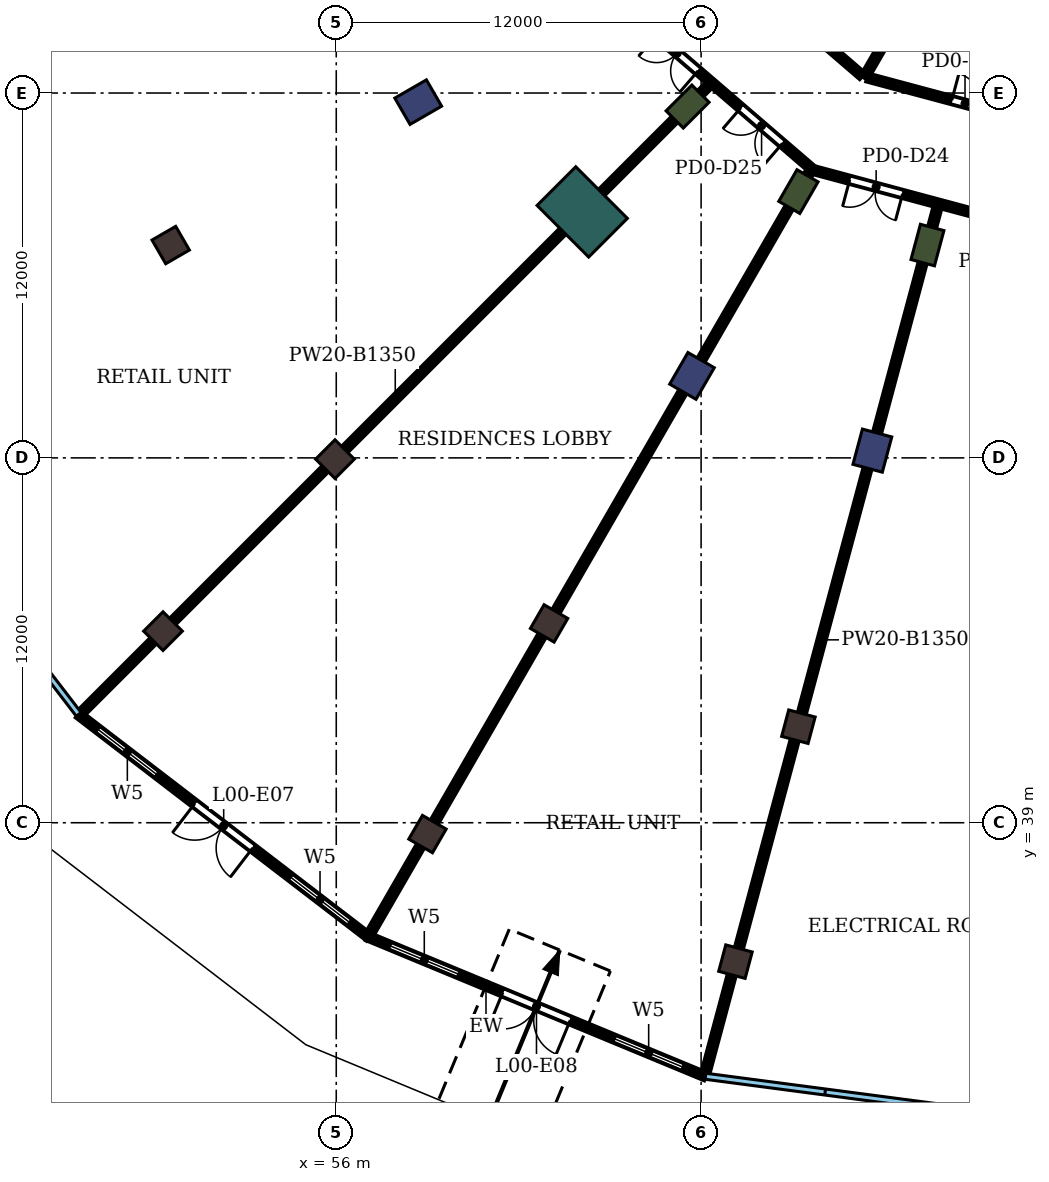
"""IFC4 building model, lengths in metres.
Left out: names, types, materials, properties, quantities, classifications, styles, units other than length and angle.
Written with IfcOpenShell. Run it as: python <this file> out.ifc"""

import sys

from ifc_helpers import new_model, si_unit, direction, frame, frame_2d, origin, origin_2d, place, context, subcontext, project, spatial, rectangle, extrude, element, fill, save


model = new_model("IFC4")
c1 = context("Model", 3, precision=1e-05, world=origin(), true_north=direction((0.0, 1.0)))
c2 = subcontext(c1, "Body", "Model", "MODEL_VIEW")
j1 = project(units=[si_unit("LENGTHUNIT", "METRE"), si_unit("PLANEANGLEUNIT", "RADIAN")], contexts=[c1])
p1 = place(None, origin())
s1 = spatial("IfcSite", under=j1, at=p1, CompositionType="ELEMENT")
p2 = place(p1, origin())
s2 = spatial("IfcBuilding", under=s1, at=p2, CompositionType="ELEMENT")
p3 = place(p2, origin())
s3 = spatial("IfcBuildingStorey", under=s2, at=p3, CompositionType="ELEMENT", Elevation=0.0)
for number, where, z_axis, x_axis in (
    (1, (50.302, 45.302, 0.0), (0.0, 0.0, 1.0), (-0.707, -0.707, 0.0)),
    (2, (59.0, 38.627, 0.0), (0.0, 0.0, 1.0), (-0.5, -0.866, 0.0)),
    (3, (69.13, 34.431, 0.0), (0.0, 0.0, 1.0), (-0.259, -0.966, 0.0)),
    (4, (50.555, 58.0, 0.0), (0.0, 0.0, 1.0), (-0.866, -0.5, 0.0)),
    (5, (55.958, 50.958, 0.0), (0.0, 0.0, 1.0), (-0.707, -0.707, 0.0)),
    (6, (63.0, 45.555, 0.0), (0.0, 0.0, 1.0), (-0.5, -0.866, 0.0)),
    (7, (71.2, 42.158, 0.0), (0.0, 0.0, 1.0), (-0.259, -0.966, 0.0)),
):
    element("IfcColumn", number, at=place(p3, frame(where, z_axis=z_axis, x_axis=x_axis)), inside=s3, PredefinedType="COLUMN", context=c2, shape_type="SweptSolid", body=[
        extrude(rectangle(XDim=0.9, YDim=0.9, at=origin_2d()), origin(), (0.0, 0.0, 1.0), 7.0),
    ])
for number, where, z_axis, x_axis in (
    (8, (58.696, 62.7, 0.0), (0.0, 0.0, 1.0), (-0.866, -0.5, 0.0)),
    (9, (67.7, 53.696, 0.0), (0.0, 0.0, 1.0), (-0.5, -0.866, 0.0)),
    (10, (73.633, 51.238, 0.0), (0.0, 0.0, 1.0), (-0.259, -0.966, 0.0)),
):
    element("IfcColumn", number, at=place(p3, frame(where, z_axis=z_axis, x_axis=x_axis)), inside=s3, PredefinedType="COLUMN", context=c2, shape_type="SweptSolid", body=[
        extrude(rectangle(XDim=1.2, YDim=1.0, at=origin_2d()), origin(), (0.0, 0.0, 1.0), 7.0),
    ])
for number, where, z_axis, x_axis in (
    (11, (67.555, 62.555, 0.0), (0.0, 0.0, 1.0), (-0.707, -0.707, 0.0)),
    (12, (71.2, 59.758, 0.0), (0.0, 0.0, 1.0), (-0.5, -0.866, 0.0)),
    (13, (75.445, 58.0, 0.0), (0.0, 0.0, 1.0), (-0.259, -0.966, 0.0)),
):
    element("IfcColumn", number, at=place(p3, frame(where, z_axis=z_axis, x_axis=x_axis)), inside=s3, PredefinedType="COLUMN", context=c2, shape_type="SweptSolid", body=[
        extrude(rectangle(XDim=1.2, YDim=0.8, at=origin_2d()), origin(), (0.0, 0.0, 1.0), 7.0),
    ])
p4 = place(p3, frame((64.09, 59.09, 0.0), z_axis=(0.0, 0.0, 1.0), x_axis=(-0.707106781187, -0.707106781187, 0.0)))
e14 = element("IfcColumn", 14, at=p4, inside=s3, PredefinedType="COLUMN", context=c2, shape_type="SweptSolid", body=[
    extrude(rectangle(XDim=1.8, YDim=2.4, at=origin_2d()), origin(), (0.0, 0.0, 1.0), 7.0),
])
p5 = place(p3, frame((47.544, 42.544, 0.0), z_axis=(0.0, 0.0, 1.0), x_axis=(0.793357384068, -0.608756159021, 0.0)))
e15 = element("IfcWall", 15, at=p5, inside=s3, PredefinedType="NOTDEFINED", context=c2, shape_type="SweptSolid", body=[
    extrude(rectangle(XDim=11.982, YDim=0.2, at=frame_2d((5.991, 0.0))), origin(), (0.0, 0.0, 1.0), 7.0),
])
p6 = place(p5, frame((0.797, 0.0, 0.9)))
e16 = element("IfcOpeningElement", 16, at=p6, cuts=e15, PredefinedType="OPENING", context=c2, shape_type="SweptSolid", body=[
    extrude(rectangle(XDim=2.4, YDim=3.6, at=frame_2d((1.2, 1.8))), frame((0.0, 0.11, 0.0), z_axis=(0.0, -1.0, 0.0), x_axis=(1.0, 0.0, 0.0)), (0.0, 0.0, 1.0), 0.22),
])
p7 = place(p5, frame((4.791, 0.0, 0.0)))
e17 = element("IfcOpeningElement", 17, at=p7, cuts=e15, PredefinedType="OPENING", context=c2, shape_type="SweptSolid", body=[
    extrude(rectangle(XDim=2.4, YDim=2.7, at=frame_2d((1.2, 1.35))), frame((0.0, 0.11, 0.0), z_axis=(0.0, -1.0, 0.0), x_axis=(1.0, 0.0, 0.0)), (0.0, 0.0, 1.0), 0.22),
])
p8 = place(p5, frame((8.785, 0.0, 0.9)))
e18 = element("IfcOpeningElement", 18, at=p8, cuts=e15, PredefinedType="OPENING", context=c2, shape_type="SweptSolid", body=[
    extrude(rectangle(XDim=2.4, YDim=3.6, at=frame_2d((1.2, 1.8))), frame((0.0, 0.11, 0.0), z_axis=(0.0, -1.0, 0.0), x_axis=(1.0, 0.0, 0.0)), (0.0, 0.0, 1.0), 0.22),
])
p9 = place(p3, frame((57.051, 35.25, 0.0), z_axis=(0.0, 0.0, 1.0), x_axis=(0.923874283273, -0.382696104901, 0.0)))
e19 = element("IfcWall", 19, at=p9, inside=s3, PredefinedType="NOTDEFINED", context=c2, shape_type="SweptSolid", body=[
    extrude(rectangle(XDim=11.982, YDim=0.2, at=frame_2d((5.991, 0.0))), origin(), (0.0, 0.0, 1.0), 7.0),
])
p10 = place(p9, frame((0.797, 0.0, 0.9)))
e20 = element("IfcOpeningElement", 20, at=p10, cuts=e19, PredefinedType="OPENING", context=c2, shape_type="SweptSolid", body=[
    extrude(rectangle(XDim=2.4, YDim=3.6, at=frame_2d((1.2, 1.8))), frame((0.0, 0.11, 0.0), z_axis=(0.0, -1.0, 0.0), x_axis=(1.0, 0.0, 0.0)), (0.0, 0.0, 1.0), 0.22),
])
p11 = place(p9, frame((4.791, 0.0, 0.0)))
e21 = element("IfcOpeningElement", 21, at=p11, cuts=e19, PredefinedType="OPENING", context=c2, shape_type="SweptSolid", body=[
    extrude(rectangle(XDim=2.4, YDim=2.7, at=frame_2d((1.2, 1.35))), frame((0.0, 0.11, 0.0), z_axis=(0.0, -1.0, 0.0), x_axis=(1.0, 0.0, 0.0)), (0.0, 0.0, 1.0), 0.22),
])
p12 = place(p9, frame((8.785, 0.0, 0.9)))
e22 = element("IfcOpeningElement", 22, at=p12, cuts=e19, PredefinedType="OPENING", context=c2, shape_type="SweptSolid", body=[
    extrude(rectangle(XDim=2.4, YDim=3.6, at=frame_2d((1.2, 1.8))), frame((0.0, 0.11, 0.0), z_axis=(0.0, -1.0, 0.0), x_axis=(1.0, 0.0, 0.0)), (0.0, 0.0, 1.0), 0.22),
])
p13 = place(p3, frame((47.615, 42.615, 0.0), z_axis=(0.0, 0.0, 1.0), x_axis=(0.707106781187, 0.707106781187, 0.0)))
e23 = element("IfcWall", 23, at=p13, inside=s3, PredefinedType="PARTITIONING", context=c2, shape_type="SweptSolid", body=[
    extrude(rectangle(XDim=29.203, YDim=0.2, at=frame_2d((14.602, 0.0))), origin(), (0.0, 0.0, 1.0), 5.65),
])
p14 = place(p3, frame((57.099, 35.339, 0.0), z_axis=(0.0, 0.0, 1.0), x_axis=(0.500039914135, 0.866002358122, 0.0)))
e24 = element("IfcWall", 24, at=p14, inside=s3, PredefinedType="PARTITIONING", context=c2, shape_type="SweptSolid", body=[
    extrude(rectangle(XDim=28.958, YDim=0.2, at=frame_2d((14.479, 0.0))), origin(), (0.0, 0.0, 1.0), 5.65),
])
p15 = place(p3, frame((66.302, 65.1, 0.0), z_axis=(0.0, 0.0, 1.0), x_axis=(0.757895579626, -0.652375881209, 0.0)))
e25 = element("IfcWall", 25, at=p15, inside=s3, PredefinedType="PARTITIONING", context=c2, shape_type="SweptSolid", body=[
    extrude(rectangle(XDim=7.062, YDim=0.2, at=frame_2d((3.531, 0.0))), origin(), (0.0, 0.0, 1.0), 6.55),
])
p16 = place(p15, frame((3.964, 0.0, 0.0)))
e26 = element("IfcOpeningElement", 26, at=p16, cuts=e25, PredefinedType="OPENING", context=c2, shape_type="SweptSolid", body=[
    extrude(rectangle(XDim=1.8, YDim=2.1, at=frame_2d((0.9, 1.05))), frame((0.0, 0.11, 0.0), z_axis=(0.0, -1.0, 0.0), x_axis=(1.0, 0.0, 0.0)), (0.0, 0.0, 1.0), 0.22),
])
p17 = place(p15, frame((0.306, 0.0, 0.0)))
e27 = element("IfcOpeningElement", 27, at=p17, cuts=e25, PredefinedType="OPENING", context=c2, shape_type="SweptSolid", body=[
    extrude(rectangle(XDim=1.8, YDim=2.1, at=frame_2d((0.9, 1.05))), frame((0.0, 0.11, 0.0), z_axis=(0.0, -1.0, 0.0), x_axis=(1.0, 0.0, 0.0)), (0.0, 0.0, 1.0), 0.22),
])
p18 = place(p3, frame((68.142, 30.764, 0.0), z_axis=(0.0, 0.0, 1.0), x_axis=(0.258909634149, 0.965901548474, 0.0)))
e28 = element("IfcWall", 28, at=p18, inside=s3, PredefinedType="PARTITIONING", context=c2, shape_type="SweptSolid", body=[
    extrude(rectangle(XDim=29.509, YDim=0.2, at=frame_2d((14.754, 0.0))), origin(), (0.0, 0.0, 1.0), 5.65),
])
p19 = place(p3, frame((69.771, 66.6, 0.0), z_axis=(0.0, 0.0, 1.0), x_axis=(0.758040611529, -0.652207352974, 0.0)))
e29 = element("IfcWall", 29, at=p19, inside=s3, PredefinedType="PARTITIONING", context=c2, shape_type="SweptSolid", body=[
    extrude(rectangle(XDim=4.625, YDim=0.2, at=frame_2d((2.312, 0.0))), origin(), (0.0, 0.0, 1.0), 6.55),
])
p20 = place(p19, frame((1.887, 0.0, 0.0)))
e30 = element("IfcOpeningElement", 30, at=p20, cuts=e29, PredefinedType="OPENING", context=c2, shape_type="SweptSolid", body=[
    extrude(rectangle(XDim=0.9, YDim=2.1, at=frame_2d((0.45, 1.05))), frame((0.0, 0.11, 0.0), z_axis=(0.0, -1.0, 0.0), x_axis=(1.0, 0.0, 0.0)), (0.0, 0.0, 1.0), 0.22),
])
p21 = place(p3, frame((71.685, 60.468, 0.0), z_axis=(0.0, 0.0, 1.0), x_axis=(0.96590736437, -0.258887936097, 0.0)))
e31 = element("IfcWall", 31, at=p21, inside=s3, PredefinedType="PARTITIONING", context=c2, shape_type="SweptSolid", body=[
    extrude(rectangle(XDim=8.519, YDim=0.2, at=frame_2d((4.259, 0.0))), origin(), (0.0, 0.0, 1.0), 6.55),
])
p22 = place(p21, frame((5.979, 0.0, 0.0)))
e32 = element("IfcOpeningElement", 32, at=p22, cuts=e31, PredefinedType="OPENING", context=c2, shape_type="SweptSolid", body=[
    extrude(rectangle(XDim=0.9, YDim=2.1, at=frame_2d((0.45, 1.05))), frame((0.0, 0.11, 0.0), z_axis=(0.0, -1.0, 0.0), x_axis=(1.0, 0.0, 0.0)), (0.0, 0.0, 1.0), 0.22),
])
p23 = place(p21, frame((1.245, 0.0, 0.0)))
e33 = element("IfcOpeningElement", 33, at=p23, cuts=e31, PredefinedType="OPENING", context=c2, shape_type="SweptSolid", body=[
    extrude(rectangle(XDim=1.8, YDim=2.1, at=frame_2d((0.9, 1.05))), frame((0.0, 0.11, 0.0), z_axis=(0.0, -1.0, 0.0), x_axis=(1.0, 0.0, 0.0)), (0.0, 0.0, 1.0), 0.22),
])
p24 = place(p3, frame((73.499, 63.502, 0.0), z_axis=(0.0, 0.0, 1.0), x_axis=(0.965923617359, -0.258827288799, 0.0)))
e34 = element("IfcWall", 34, at=p24, inside=s3, PredefinedType="PARTITIONING", context=c2, shape_type="SweptSolid", body=[
    extrude(rectangle(XDim=6.601, YDim=0.2, at=frame_2d((3.3, 0.0))), origin(), (0.0, 0.0, 1.0), 6.55),
])
p25 = place(p24, frame((2.844, 0.0, 0.0)))
e35 = element("IfcOpeningElement", 35, at=p25, cuts=e34, PredefinedType="OPENING", context=c2, shape_type="SweptSolid", body=[
    extrude(rectangle(XDim=0.9, YDim=2.1, at=frame_2d((0.45, 1.05))), frame((0.0, 0.11, 0.0), z_axis=(0.0, -1.0, 0.0), x_axis=(1.0, 0.0, 0.0)), (0.0, 0.0, 1.0), 0.22),
])
p26 = place(p3, frame((73.379, 63.534, 0.0), z_axis=(0.0, 0.0, 1.0), x_axis=(0.500033892615, 0.86600583499, 0.0)))
e36 = element("IfcWall", 36, at=p26, inside=s3, PredefinedType="PARTITIONING", context=c2, shape_type="SweptSolid", body=[
    extrude(rectangle(XDim=5.542, YDim=0.2, at=frame_2d((2.771, 0.0))), origin(), (0.0, 0.0, 1.0), 6.55),
])
p27 = place(p6, origin())
e37 = element("IfcWindow", 37, at=p27, inside=s3, PartitioningType="SINGLE_PANEL", PredefinedType="WINDOW", context=c2, shape_type="SweptSolid", body=[
    extrude(rectangle(XDim=2.4, YDim=3.6, at=frame_2d((1.2, 1.8))), frame((0.0, 0.03, 0.0), z_axis=(0.0, -1.0, 0.0), x_axis=(1.0, 0.0, 0.0)), (0.0, 0.0, 1.0), 0.06),
])
fill(e16, e37)
p28 = place(p7, frame((2.4, 0.0, 0.0), z_axis=(0.0, 0.0, 1.0), x_axis=(-1.0, 0.0, 0.0)))
e38 = element("IfcDoor", 38, at=p28, inside=s3, OperationType="DOUBLE_DOOR_SINGLE_SWING", PredefinedType="DOOR", context=c2, shape_type="SweptSolid", body=[
    extrude(rectangle(XDim=2.4, YDim=2.7, at=frame_2d((1.2, 1.35))), frame((0.0, 0.025, 0.0), z_axis=(0.0, -1.0, 0.0), x_axis=(1.0, 0.0, 0.0)), (0.0, 0.0, 1.0), 0.05),
])
fill(e17, e38)
p29 = place(p8, origin())
e39 = element("IfcWindow", 39, at=p29, inside=s3, PartitioningType="SINGLE_PANEL", PredefinedType="WINDOW", context=c2, shape_type="SweptSolid", body=[
    extrude(rectangle(XDim=2.4, YDim=3.6, at=frame_2d((1.2, 1.8))), frame((0.0, 0.03, 0.0), z_axis=(0.0, -1.0, 0.0), x_axis=(1.0, 0.0, 0.0)), (0.0, 0.0, 1.0), 0.06),
])
fill(e18, e39)
p30 = place(p10, origin())
e40 = element("IfcWindow", 40, at=p30, inside=s3, PartitioningType="SINGLE_PANEL", PredefinedType="WINDOW", context=c2, shape_type="SweptSolid", body=[
    extrude(rectangle(XDim=2.4, YDim=3.6, at=frame_2d((1.2, 1.8))), frame((0.0, 0.03, 0.0), z_axis=(0.0, -1.0, 0.0), x_axis=(1.0, 0.0, 0.0)), (0.0, 0.0, 1.0), 0.06),
])
fill(e20, e40)
p31 = place(p11, frame((2.4, 0.0, 0.0), z_axis=(0.0, 0.0, 1.0), x_axis=(-1.0, 0.0, 0.0)))
e41 = element("IfcDoor", 41, at=p31, inside=s3, OperationType="DOUBLE_DOOR_SINGLE_SWING", PredefinedType="DOOR", context=c2, shape_type="SweptSolid", body=[
    extrude(rectangle(XDim=2.4, YDim=2.7, at=frame_2d((1.2, 1.35))), frame((0.0, 0.025, 0.0), z_axis=(0.0, -1.0, 0.0), x_axis=(1.0, 0.0, 0.0)), (0.0, 0.0, 1.0), 0.05),
])
fill(e21, e41)
p32 = place(p12, origin())
e42 = element("IfcWindow", 42, at=p32, inside=s3, PartitioningType="SINGLE_PANEL", PredefinedType="WINDOW", context=c2, shape_type="SweptSolid", body=[
    extrude(rectangle(XDim=2.4, YDim=3.6, at=frame_2d((1.2, 1.8))), frame((0.0, 0.03, 0.0), z_axis=(0.0, -1.0, 0.0), x_axis=(1.0, 0.0, 0.0)), (0.0, 0.0, 1.0), 0.06),
])
fill(e22, e42)
p33 = place(p23, frame((1.8, 0.0, 0.0), z_axis=(0.0, 0.0, 1.0), x_axis=(-1.0, 0.0, 0.0)))
e43 = element("IfcDoor", 43, at=p33, inside=s3, OperationType="DOUBLE_DOOR_SINGLE_SWING", PredefinedType="DOOR", context=c2, shape_type="SweptSolid", body=[
    extrude(rectangle(XDim=1.8, YDim=2.1, at=frame_2d((0.9, 1.05))), frame((0.0, 0.025, 0.0), z_axis=(0.0, -1.0, 0.0), x_axis=(1.0, 0.0, 0.0)), (0.0, 0.0, 1.0), 0.05),
])
fill(e33, e43)
p34 = place(p16, frame((1.8, 0.0, 0.0), z_axis=(0.0, 0.0, 1.0), x_axis=(-1.0, 0.0, 0.0)))
e44 = element("IfcDoor", 44, at=p34, inside=s3, OperationType="DOUBLE_DOOR_SINGLE_SWING", PredefinedType="DOOR", context=c2, shape_type="SweptSolid", body=[
    extrude(rectangle(XDim=1.8, YDim=2.1, at=frame_2d((0.9, 1.05))), frame((0.0, 0.025, 0.0), z_axis=(0.0, -1.0, 0.0), x_axis=(1.0, 0.0, 0.0)), (0.0, 0.0, 1.0), 0.05),
])
fill(e26, e44)
p35 = place(p17, frame((1.8, 0.0, 0.0), z_axis=(0.0, 0.0, 1.0), x_axis=(-1.0, 0.0, 0.0)))
e45 = element("IfcDoor", 45, at=p35, inside=s3, OperationType="DOUBLE_DOOR_SINGLE_SWING", PredefinedType="DOOR", context=c2, shape_type="SweptSolid", body=[
    extrude(rectangle(XDim=1.8, YDim=2.1, at=frame_2d((0.9, 1.05))), frame((0.0, 0.025, 0.0), z_axis=(0.0, -1.0, 0.0), x_axis=(1.0, 0.0, 0.0)), (0.0, 0.0, 1.0), 0.05),
])
fill(e27, e45)
p36 = place(p25, origin())
e46 = element("IfcDoor", 46, at=p36, inside=s3, OperationType="SINGLE_SWING_LEFT", PredefinedType="DOOR", context=c2, shape_type="SweptSolid", body=[
    extrude(rectangle(XDim=0.9, YDim=2.1, at=frame_2d((0.45, 1.05))), frame((0.0, 0.025, 0.0), z_axis=(0.0, -1.0, 0.0), x_axis=(1.0, 0.0, 0.0)), (0.0, 0.0, 1.0), 0.05),
])
fill(e35, e46)
save(model, sys.argv[1])
